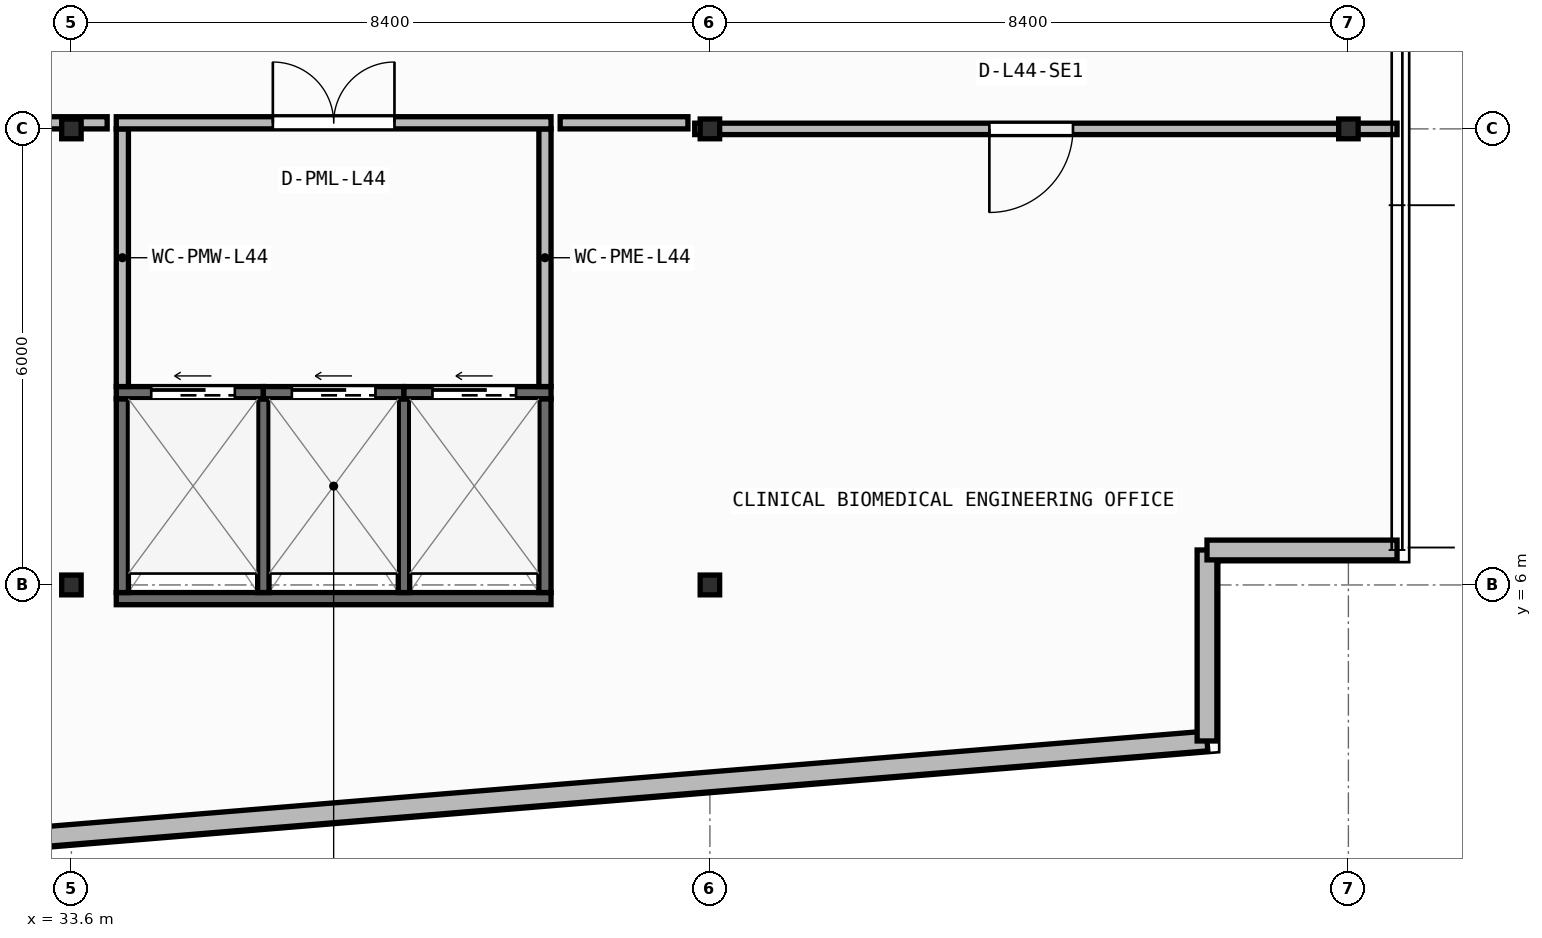
"""IFC4 building model, lengths in metres.
Left out: names, types, materials, properties, quantities, classifications, styles, units other than length and angle.
Written with IfcOpenShell. Run it as: python <this file> out.ifc"""

import sys

from ifc_helpers import new_model, si_unit, direction, frame, frame_2d, origin, origin_2d, place, context, subcontext, project, spatial, rectangle, i_section, extrude, element, fill, save


model = new_model("IFC4")
c1 = context("Model", 3, precision=1e-05, world=origin(), true_north=direction((0.0, 1.0)))
c2 = subcontext(c1, "Body", "Model", "MODEL_VIEW")
j1 = project(units=[si_unit("LENGTHUNIT", "METRE"), si_unit("PLANEANGLEUNIT", "RADIAN")], contexts=[c1])
p1 = place(None, origin())
s1 = spatial("IfcSite", under=j1, at=p1, CompositionType="ELEMENT")
p2 = place(p1, origin())
s2 = spatial("IfcBuilding", under=s1, at=p2, CompositionType="ELEMENT")
p3 = place(p2, frame((0.0, 0.0, 180.25)))
s3 = spatial("IfcBuildingStorey", under=s2, at=p3, CompositionType="ELEMENT", Elevation=180.25)
for number, where, z_axis, x_axis in (
    (1, (33.6, 6.0, 0.0), (0.0, 0.0, 1.0), (1.0, 0.0, 0.0)),
    (2, (42.0, 6.0, 0.0), (0.0, 0.0, 1.0), (1.0, 0.0, 0.0)),
    (3, (33.6, 12.0, 0.0), (0.0, 0.0, 1.0), (1.0, 0.0, 0.0)),
    (4, (42.0, 12.0, 0.0), (0.0, 0.0, 1.0), (1.0, 0.0, 0.0)),
    (5, (50.4, 12.0, 0.0), (0.0, 0.0, 1.0), (1.0, 0.0, 0.0)),
):
    element("IfcColumn", number, at=place(p3, frame(where, z_axis=z_axis, x_axis=x_axis)), inside=s3, PredefinedType="COLUMN", context=c2, shape_type="SweptSolid", body=[
        extrude(i_section(OverallWidth=0.256, OverallDepth=0.26, WebThickness=0.01, FlangeThickness=0.017, FilletRadius=0.013, at=origin_2d()), origin(), (0.0, 0.0, 1.0), 3.95),
    ])
p4 = place(p3, frame((2.66, 0.174, 0.0), z_axis=(0.0, 0.0, 1.0), x_axis=(0.996634028439, 0.081979347142, 0.0)))
e6 = element("IfcWall", 6, at=p4, inside=s3, PredefinedType="STANDARD", context=c2, shape_type="SweptSolid", body=[
    extrude(rectangle(XDim=46.035, YDim=0.26, at=frame_2d((23.018, 0.0))), origin(), (0.0, 0.0, 1.0), 3.71),
])
p5 = place(p4, frame((21.817, 0.0, 0.9)))
e7 = element("IfcOpeningElement", 7, at=p5, cuts=e6, PredefinedType="OPENING", context=c2, shape_type="SweptSolid", body=[
    extrude(rectangle(XDim=2.4, YDim=1.65, at=frame_2d((1.2, 0.825))), frame((0.0, 0.14, 0.0), z_axis=(0.0, -1.0, 0.0), x_axis=(1.0, 0.0, 0.0)), (0.0, 0.0, 1.0), 0.28),
])
p6 = place(p3, frame((48.54, 3.948, 0.0), z_axis=(0.0, 0.0, 1.0), x_axis=(0.0, 1.0, 0.0)))
e8 = element("IfcWall", 8, at=p6, inside=s3, PredefinedType="STANDARD", context=c2, shape_type="SweptSolid", body=[
    extrude(rectangle(XDim=2.512, YDim=0.26, at=frame_2d((1.256, 0.0))), origin(), (0.0, 0.0, 1.0), 3.71),
])
p7 = place(p3, frame((48.54, 6.46, 0.0), z_axis=(0.0, 0.0, 1.0), x_axis=(1.0, 0.0, 0.0)))
e9 = element("IfcWall", 9, at=p7, inside=s3, PredefinedType="STANDARD", context=c2, shape_type="SweptSolid", body=[
    extrude(rectangle(XDim=2.5, YDim=0.26, at=frame_2d((1.25, 0.0))), origin(), (0.0, 0.0, 1.0), 3.71),
])
p8 = place(p3, frame((34.19, 5.82, 0.0), z_axis=(0.0, 0.0, 1.0), x_axis=(1.0, 0.0, 0.0)))
e10 = element("IfcWall", 10, at=p8, inside=s3, PredefinedType="SHEAR", context=c2, shape_type="SweptSolid", body=[
    extrude(rectangle(XDim=5.72, YDim=0.16, at=frame_2d((2.86, 0.0))), origin(), (0.0, 0.0, 1.0), 3.71),
])
for number, where, z_axis, x_axis in (
    (11, (34.27, 5.9, 0.0), (0.0, 0.0, 1.0), (0.0, 1.0, 0.0)),
    (12, (39.83, 5.9, 0.0), (0.0, 0.0, 1.0), (0.0, 1.0, 0.0)),
):
    element("IfcWall", number, at=place(p3, frame(where, z_axis=z_axis, x_axis=x_axis)), inside=s3, PredefinedType="SHEAR", context=c2, shape_type="SweptSolid", body=[
        extrude(rectangle(XDim=2.55, YDim=0.16, at=frame_2d((1.275, 0.0))), origin(), (0.0, 0.0, 1.0), 3.71),
    ])
for number, where, z_axis, x_axis in (
    (13, (36.125, 5.9, 0.0), (0.0, 0.0, 1.0), (0.0, 1.0, 0.0)),
    (14, (37.975, 5.9, 0.0), (0.0, 0.0, 1.0), (0.0, 1.0, 0.0)),
):
    element("IfcWall", number, at=place(p3, frame(where, z_axis=z_axis, x_axis=x_axis)), inside=s3, PredefinedType="SHEAR", context=c2, shape_type="SweptSolid", body=[
        extrude(rectangle(XDim=2.55, YDim=0.15, at=frame_2d((1.275, 0.0))), origin(), (0.0, 0.0, 1.0), 3.71),
    ])
p9 = place(p3, frame((34.19, 8.53, 0.0), z_axis=(0.0, 0.0, 1.0), x_axis=(1.0, 0.0, 0.0)))
e15 = element("IfcWall", 15, at=p9, inside=s3, PredefinedType="SHEAR", context=c2, shape_type="SweptSolid", body=[
    extrude(rectangle(XDim=1.935, YDim=0.16, at=frame_2d((0.968, 0.0))), origin(), (0.0, 0.0, 1.0), 3.71),
])
p10 = place(p9, frame((0.46, 0.0, 0.0)))
e16 = element("IfcOpeningElement", 16, at=p10, cuts=e15, PredefinedType="OPENING", context=c2, shape_type="SweptSolid", body=[
    extrude(rectangle(XDim=1.1, YDim=2.15, at=frame_2d((0.55, 1.075))), frame((0.0, 0.09, 0.0), z_axis=(0.0, -1.0, 0.0), x_axis=(1.0, 0.0, 0.0)), (0.0, 0.0, 1.0), 0.18),
])
p11 = place(p3, frame((36.125, 8.53, 0.0), z_axis=(0.0, 0.0, 1.0), x_axis=(1.0, 0.0, 0.0)))
e17 = element("IfcWall", 17, at=p11, inside=s3, PredefinedType="SHEAR", context=c2, shape_type="SweptSolid", body=[
    extrude(rectangle(XDim=1.85, YDim=0.16, at=frame_2d((0.925, 0.0))), origin(), (0.0, 0.0, 1.0), 3.71),
])
p12 = place(p11, frame((0.375, 0.0, 0.0)))
e18 = element("IfcOpeningElement", 18, at=p12, cuts=e17, PredefinedType="OPENING", context=c2, shape_type="SweptSolid", body=[
    extrude(rectangle(XDim=1.1, YDim=2.15, at=frame_2d((0.55, 1.075))), frame((0.0, 0.09, 0.0), z_axis=(0.0, -1.0, 0.0), x_axis=(1.0, 0.0, 0.0)), (0.0, 0.0, 1.0), 0.18),
])
p13 = place(p3, frame((37.975, 8.53, 0.0), z_axis=(0.0, 0.0, 1.0), x_axis=(1.0, 0.0, 0.0)))
e19 = element("IfcWall", 19, at=p13, inside=s3, PredefinedType="SHEAR", context=c2, shape_type="SweptSolid", body=[
    extrude(rectangle(XDim=1.935, YDim=0.16, at=frame_2d((0.967, 0.0))), origin(), (0.0, 0.0, 1.0), 3.71),
])
p14 = place(p13, frame((0.375, 0.0, 0.0)))
e20 = element("IfcOpeningElement", 20, at=p14, cuts=e19, PredefinedType="OPENING", context=c2, shape_type="SweptSolid", body=[
    extrude(rectangle(XDim=1.1, YDim=2.15, at=frame_2d((0.55, 1.075))), frame((0.0, 0.09, 0.0), z_axis=(0.0, -1.0, 0.0), x_axis=(1.0, 0.0, 0.0)), (0.0, 0.0, 1.0), 0.18),
])
for number, where, z_axis, x_axis in (
    (21, (34.27, 8.61, 0.0), (0.0, 0.0, 1.0), (0.0, 1.0, 0.0)),
    (22, (39.83, 8.61, 0.0), (0.0, 0.0, 1.0), (0.0, 1.0, 0.0)),
):
    element("IfcWall", number, at=place(p3, frame(where, z_axis=z_axis, x_axis=x_axis)), inside=s3, PredefinedType="PARTITIONING", context=c2, shape_type="SweptSolid", body=[
        extrude(rectangle(XDim=3.39, YDim=0.16, at=frame_2d((1.695, 0.0))), origin(), (0.0, 0.0, 1.0), 3.71),
    ])
p15 = place(p3, frame((34.19, 12.08, 0.0), z_axis=(0.0, 0.0, 1.0), x_axis=(1.0, 0.0, 0.0)))
e23 = element("IfcWall", 23, at=p15, inside=s3, PredefinedType="PARTITIONING", context=c2, shape_type="SweptSolid", body=[
    extrude(rectangle(XDim=5.72, YDim=0.16, at=frame_2d((2.86, 0.0))), origin(), (0.0, 0.0, 1.0), 3.152),
])
p16 = place(p15, frame((2.06, 0.0, 0.0)))
e24 = element("IfcOpeningElement", 24, at=p16, cuts=e23, PredefinedType="OPENING", context=c2, shape_type="SweptSolid", body=[
    extrude(rectangle(XDim=1.6, YDim=2.05, at=frame_2d((0.8, 1.025))), frame((0.0, 0.09, 0.0), z_axis=(0.0, -1.0, 0.0), x_axis=(1.0, 0.0, 0.0)), (0.0, 0.0, 1.0), 0.18),
])
p17 = place(p3, frame((51.04, 12.0, 0.0), z_axis=(0.0, 0.0, 1.0), x_axis=(-1.0, 0.0, 0.0)))
e25 = element("IfcWall", 25, at=p17, inside=s3, PredefinedType="PARTITIONING", context=c2, shape_type="SweptSolid", body=[
    extrude(rectangle(XDim=9.24, YDim=0.15, at=frame_2d((4.62, 0.0))), origin(), (0.0, 0.0, 1.0), 3.152),
])
p18 = place(p17, frame((4.263, 0.0, 0.0)))
e26 = element("IfcOpeningElement", 26, at=p18, cuts=e25, PredefinedType="OPENING", context=c2, shape_type="SweptSolid", body=[
    extrude(rectangle(XDim=1.1, YDim=2.1, at=frame_2d((0.55, 1.05))), frame((0.0, 0.085, 0.0), z_axis=(0.0, -1.0, 0.0), x_axis=(1.0, 0.0, 0.0)), (0.0, 0.0, 1.0), 0.17),
])
p19 = place(p3, frame((31.439, 12.08, 0.0), z_axis=(0.0, 0.0, 1.0), x_axis=(1.0, 0.0, 0.0)))
e27 = element("IfcWall", 27, at=p19, inside=s3, PredefinedType="PARTITIONING", context=c2, shape_type="SweptSolid", body=[
    extrude(rectangle(XDim=2.631, YDim=0.16, at=frame_2d((1.315, 0.0))), origin(), (0.0, 0.0, 1.0), 3.152),
])
p20 = place(p3, frame((40.03, 12.08, 0.0), z_axis=(0.0, 0.0, 1.0), x_axis=(1.0, 0.0, 0.0)))
e28 = element("IfcWall", 28, at=p20, inside=s3, PredefinedType="PARTITIONING", context=c2, shape_type="SweptSolid", body=[
    extrude(rectangle(XDim=1.681, YDim=0.16, at=frame_2d((0.84, 0.0))), origin(), (0.0, 0.0, 1.0), 3.152),
])
p21 = place(p10, origin())
e29 = element("IfcDoor", 29, at=p21, inside=s3, OperationType="SLIDING_TO_LEFT", PredefinedType="DOOR", context=c2, shape_type="SweptSolid", body=[
    extrude(rectangle(XDim=1.1, YDim=2.15, at=frame_2d((0.55, 1.075))), frame((0.0, 0.025, 0.0), z_axis=(0.0, -1.0, 0.0), x_axis=(1.0, 0.0, 0.0)), (0.0, 0.0, 1.0), 0.05),
])
fill(e16, e29)
p22 = place(p12, origin())
e30 = element("IfcDoor", 30, at=p22, inside=s3, OperationType="SLIDING_TO_LEFT", PredefinedType="DOOR", context=c2, shape_type="SweptSolid", body=[
    extrude(rectangle(XDim=1.1, YDim=2.15, at=frame_2d((0.55, 1.075))), frame((0.0, 0.025, 0.0), z_axis=(0.0, -1.0, 0.0), x_axis=(1.0, 0.0, 0.0)), (0.0, 0.0, 1.0), 0.05),
])
fill(e18, e30)
p23 = place(p14, origin())
e31 = element("IfcDoor", 31, at=p23, inside=s3, OperationType="SLIDING_TO_LEFT", PredefinedType="DOOR", context=c2, shape_type="SweptSolid", body=[
    extrude(rectangle(XDim=1.1, YDim=2.15, at=frame_2d((0.55, 1.075))), frame((0.0, 0.025, 0.0), z_axis=(0.0, -1.0, 0.0), x_axis=(1.0, 0.0, 0.0)), (0.0, 0.0, 1.0), 0.05),
])
fill(e20, e31)
p24 = place(p16, origin())
e32 = element("IfcDoor", 32, at=p24, inside=s3, OperationType="DOUBLE_DOOR_SINGLE_SWING", PredefinedType="DOOR", context=c2, shape_type="SweptSolid", body=[
    extrude(rectangle(XDim=1.6, YDim=2.05, at=frame_2d((0.8, 1.025))), frame((0.0, 0.025, 0.0), z_axis=(0.0, -1.0, 0.0), x_axis=(1.0, 0.0, 0.0)), (0.0, 0.0, 1.0), 0.05),
])
fill(e24, e32)
p25 = place(p18, origin())
e33 = element("IfcDoor", 33, at=p25, inside=s3, OperationType="SINGLE_SWING_RIGHT", PredefinedType="DOOR", context=c2, shape_type="SweptSolid", body=[
    extrude(rectangle(XDim=1.1, YDim=2.1, at=frame_2d((0.55, 1.05))), frame((0.0, 0.025, 0.0), z_axis=(0.0, -1.0, 0.0), x_axis=(1.0, 0.0, 0.0)), (0.0, 0.0, 1.0), 0.05),
])
fill(e26, e33)
save(model, sys.argv[1])
